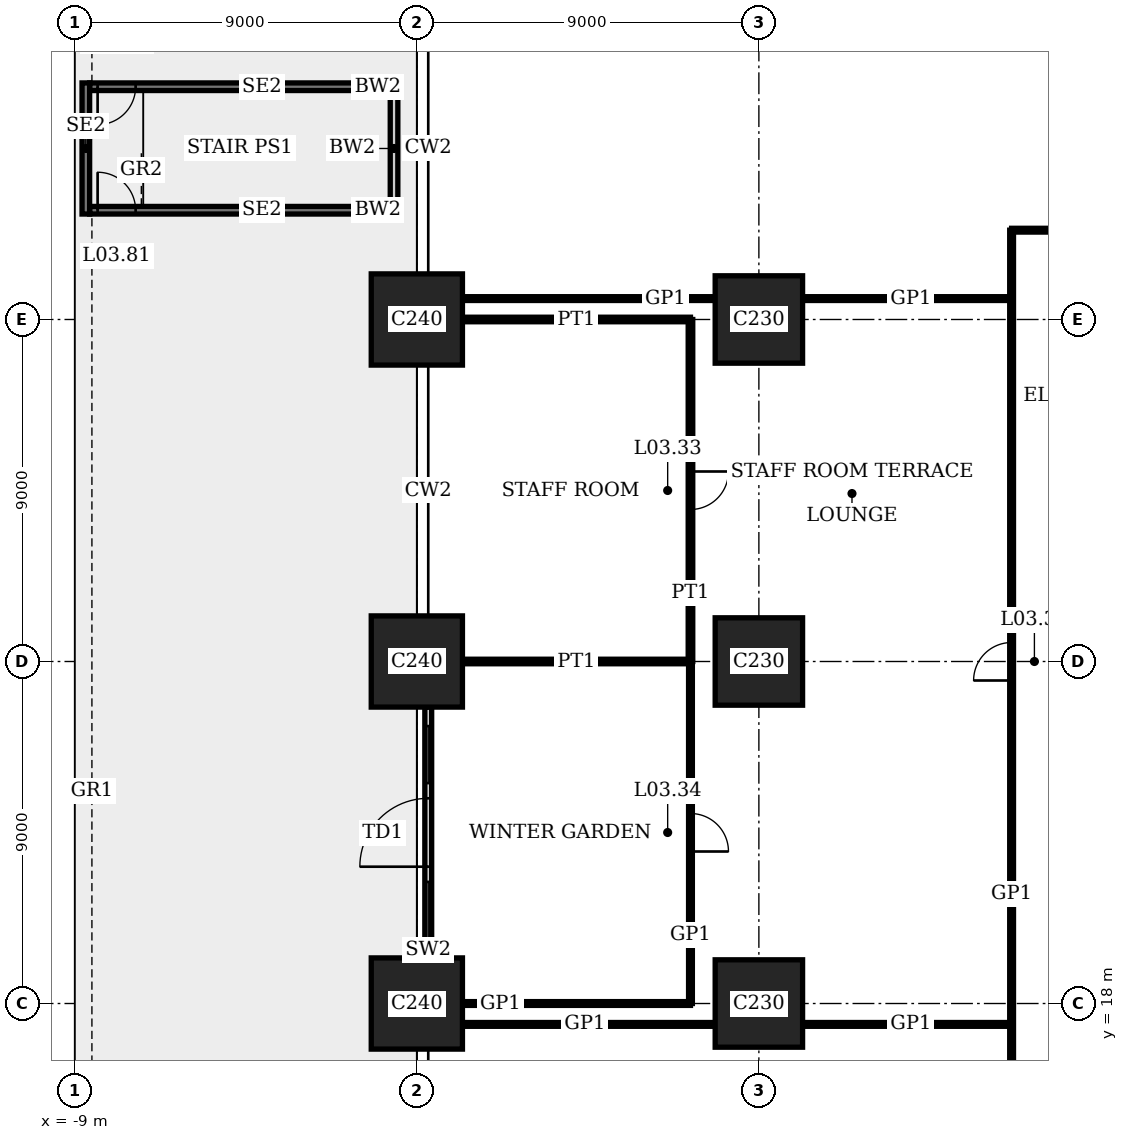
"""IFC4 building model, lengths in metres.
Left out: names, types, materials, properties, quantities, classifications, styles, units other than length and angle.
Written with IfcOpenShell. Run it as: python <this file> out.ifc"""

import sys

from ifc_helpers import new_model, si_unit, direction, frame, frame_2d, origin, origin_2d, place, context, subcontext, project, spatial, rectangle, extrude, element, fill, save


model = new_model("IFC4")
c1 = context("Model", 3, precision=1e-05, world=origin(), true_north=direction((0.0, 1.0)))
c2 = subcontext(c1, "Body", "Model", "MODEL_VIEW")
j1 = project(units=[si_unit("LENGTHUNIT", "METRE"), si_unit("PLANEANGLEUNIT", "RADIAN")], contexts=[c1])
p1 = place(None, origin())
s1 = spatial("IfcSite", under=j1, at=p1, CompositionType="ELEMENT")
p2 = place(p1, origin())
s2 = spatial("IfcBuilding", under=s1, at=p2, CompositionType="ELEMENT")
p3 = place(p2, frame((0.0, 0.0, 15.8)))
s3 = spatial("IfcBuildingStorey", under=s2, at=p3, CompositionType="ELEMENT", Elevation=15.8)
for number, where, z_axis, x_axis in (
    (1, (0.0, 18.0, 0.0), (0.0, 0.0, 1.0), (1.0, 0.0, 0.0)),
    (2, (0.0, 27.0, 0.0), (0.0, 0.0, 1.0), (1.0, 0.0, 0.0)),
    (3, (0.0, 36.0, 0.0), (0.0, 0.0, 1.0), (1.0, 0.0, 0.0)),
):
    element("IfcColumn", number, at=place(p3, frame(where, z_axis=z_axis, x_axis=x_axis)), inside=s3, PredefinedType="COLUMN", context=c2, shape_type="SweptSolid", body=[
        extrude(rectangle(XDim=2.4, YDim=2.4, at=origin_2d()), origin(), (0.0, 0.0, 1.0), 4.0),
    ])
for number, where, z_axis, x_axis in (
    (4, (9.0, 18.0, 0.0), (0.0, 0.0, 1.0), (1.0, 0.0, 0.0)),
    (5, (9.0, 27.0, 0.0), (0.0, 0.0, 1.0), (1.0, 0.0, 0.0)),
    (6, (9.0, 36.0, 0.0), (0.0, 0.0, 1.0), (1.0, 0.0, 0.0)),
):
    element("IfcColumn", number, at=place(p3, frame(where, z_axis=z_axis, x_axis=x_axis)), inside=s3, PredefinedType="COLUMN", context=c2, shape_type="SweptSolid", body=[
        extrude(rectangle(XDim=2.3, YDim=2.3, at=origin_2d()), origin(), (0.0, 0.0, 1.0), 4.0),
    ])
p4 = place(p3, frame((0.3, 19.2, 0.0), z_axis=(0.0, 0.0, 1.0), x_axis=(0.0, 1.0, 0.0)))
e7 = element("IfcWall", 7, at=p4, inside=s3, PredefinedType="SOLIDWALL", context=c2, shape_type="SweptSolid", body=[
    extrude(rectangle(XDim=6.6, YDim=0.18, at=frame_2d((3.3, 0.0))), origin(), (0.0, 0.0, 1.0), 2.95),
])
p5 = place(p4, frame((2.4, 0.0, 0.0)))
e8 = element("IfcOpeningElement", 8, at=p5, cuts=e7, PredefinedType="OPENING", context=c2, shape_type="SweptSolid", body=[
    extrude(rectangle(XDim=1.8, YDim=2.7, at=frame_2d((0.9, 1.35))), frame((0.0, 0.1, 0.0), z_axis=(0.0, -1.0, 0.0), x_axis=(1.0, 0.0, 0.0)), (0.0, 0.0, 1.0), 0.2),
])
p6 = place(p4, frame((0.5, 0.0, 0.3)))
e9 = element("IfcOpeningElement", 9, at=p6, cuts=e7, PredefinedType="OPENING", context=c2, shape_type="SweptSolid", body=[
    extrude(rectangle(XDim=1.5, YDim=2.4, at=frame_2d((0.75, 1.2))), frame((0.0, 0.1, 0.0), z_axis=(0.0, -1.0, 0.0), x_axis=(1.0, 0.0, 0.0)), (0.0, 0.0, 1.0), 0.2),
])
p7 = place(p4, frame((4.6, 0.0, 0.3)))
e10 = element("IfcOpeningElement", 10, at=p7, cuts=e7, PredefinedType="OPENING", context=c2, shape_type="SweptSolid", body=[
    extrude(rectangle(XDim=1.5, YDim=2.4, at=frame_2d((0.75, 1.2))), frame((0.0, 0.1, 0.0), z_axis=(0.0, -1.0, 0.0), x_axis=(1.0, 0.0, 0.0)), (0.0, 0.0, 1.0), 0.2),
])
p8 = place(p3, frame((1.2, 17.45, 0.0), z_axis=(0.0, 0.0, 1.0), x_axis=(1.0, 0.0, 0.0)))
e11 = element("IfcWall", 11, at=p8, inside=s3, PredefinedType="PARTITIONING", context=c2, shape_type="SweptSolid", body=[
    extrude(rectangle(XDim=6.65, YDim=0.1, at=frame_2d((3.325, 0.0))), origin(), (0.0, 0.0, 1.0), 3.75),
])
p9 = place(p3, frame((10.15, 17.45, 0.0), z_axis=(0.0, 0.0, 1.0), x_axis=(1.0, 0.0, 0.0)))
e12 = element("IfcWall", 12, at=p9, inside=s3, PredefinedType="PARTITIONING", context=c2, shape_type="SweptSolid", body=[
    extrude(rectangle(XDim=5.5, YDim=0.1, at=frame_2d((2.75, 0.0))), origin(), (0.0, 0.0, 1.0), 3.75),
])
p10 = place(p3, frame((1.2, 18.0, 0.0), z_axis=(0.0, 0.0, 1.0), x_axis=(1.0, 0.0, 0.0)))
e13 = element("IfcWall", 13, at=p10, inside=s3, PredefinedType="PARTITIONING", context=c2, shape_type="SweptSolid", body=[
    extrude(rectangle(XDim=6.0, YDim=0.1, at=frame_2d((3.0, 0.0))), origin(), (0.0, 0.0, 1.0), 3.05),
])
for number, where, z_axis, x_axis in (
    (14, (1.2, 27.0, 0.0), (0.0, 0.0, 1.0), (1.0, 0.0, 0.0)),
    (15, (1.2, 36.0, 0.0), (0.0, 0.0, 1.0), (1.0, 0.0, 0.0)),
):
    element("IfcWall", number, at=place(p3, frame(where, z_axis=z_axis, x_axis=x_axis)), inside=s3, PredefinedType="PARTITIONING", context=c2, shape_type="SweptSolid", body=[
        extrude(rectangle(XDim=6.0, YDim=0.12, at=frame_2d((3.0, 0.0))), origin(), (0.0, 0.0, 1.0), 3.05),
    ])
p11 = place(p3, frame((1.2, 36.55, 0.0), z_axis=(0.0, 0.0, 1.0), x_axis=(1.0, 0.0, 0.0)))
e16 = element("IfcWall", 16, at=p11, inside=s3, PredefinedType="PARTITIONING", context=c2, shape_type="SweptSolid", body=[
    extrude(rectangle(XDim=6.65, YDim=0.1, at=frame_2d((3.325, 0.0))), origin(), (0.0, 0.0, 1.0), 3.75),
])
p12 = place(p3, frame((10.15, 36.55, 0.0), z_axis=(0.0, 0.0, 1.0), x_axis=(1.0, 0.0, 0.0)))
e17 = element("IfcWall", 17, at=p12, inside=s3, PredefinedType="PARTITIONING", context=c2, shape_type="SweptSolid", body=[
    extrude(rectangle(XDim=5.5, YDim=0.1, at=frame_2d((2.75, 0.0))), origin(), (0.0, 0.0, 1.0), 3.75),
])
p13 = place(p3, frame((15.65, 38.35, 0.0), z_axis=(0.0, 0.0, 1.0), x_axis=(1.0, 0.0, 0.0)))
e18 = element("IfcWall", 18, at=p13, inside=s3, PredefinedType="PARTITIONING", context=c2, shape_type="SweptSolid", body=[
    extrude(rectangle(XDim=15.85, YDim=0.1, at=frame_2d((7.925, 0.0))), origin(), (0.0, 0.0, 1.0), 3.75),
])
p14 = place(p13, frame((7.425, 0.0, 0.0)))
e19 = element("IfcOpeningElement", 19, at=p14, cuts=e18, PredefinedType="OPENING", context=c2, shape_type="SweptSolid", body=[
    extrude(rectangle(XDim=1.0, YDim=2.4, at=frame_2d((0.5, 1.2))), frame((0.0, 0.06, 0.0), z_axis=(0.0, -1.0, 0.0), x_axis=(1.0, 0.0, 0.0)), (0.0, 0.0, 1.0), 0.12),
])
p15 = place(p3, frame((7.2, 27.0, 0.0), z_axis=(0.0, 0.0, 1.0), x_axis=(0.0, 1.0, 0.0)))
e20 = element("IfcWall", 20, at=p15, inside=s3, PredefinedType="PARTITIONING", context=c2, shape_type="SweptSolid", body=[
    extrude(rectangle(XDim=9.0, YDim=0.12, at=frame_2d((4.5, 0.0))), origin(), (0.0, 0.0, 1.0), 3.75),
])
p16 = place(p15, frame((4.0, 0.0, 0.0)))
e21 = element("IfcOpeningElement", 21, at=p16, cuts=e20, PredefinedType="OPENING", context=c2, shape_type="SweptSolid", body=[
    extrude(rectangle(XDim=1.0, YDim=2.4, at=frame_2d((0.5, 1.2))), frame((0.0, 0.07, 0.0), z_axis=(0.0, -1.0, 0.0), x_axis=(1.0, 0.0, 0.0)), (0.0, 0.0, 1.0), 0.14),
])
p17 = place(p3, frame((7.2, 18.0, 0.0), z_axis=(0.0, 0.0, 1.0), x_axis=(0.0, 1.0, 0.0)))
e22 = element("IfcWall", 22, at=p17, inside=s3, PredefinedType="PARTITIONING", context=c2, shape_type="SweptSolid", body=[
    extrude(rectangle(XDim=9.0, YDim=0.1, at=frame_2d((4.5, 0.0))), origin(), (0.0, 0.0, 1.0), 3.75),
])
p18 = place(p17, frame((4.0, 0.0, 0.0)))
e23 = element("IfcOpeningElement", 23, at=p18, cuts=e22, PredefinedType="OPENING", context=c2, shape_type="SweptSolid", body=[
    extrude(rectangle(XDim=1.0, YDim=2.4, at=frame_2d((0.5, 1.2))), frame((0.0, 0.06, 0.0), z_axis=(0.0, -1.0, 0.0), x_axis=(1.0, 0.0, 0.0)), (0.0, 0.0, 1.0), 0.12),
])
p19 = place(p3, frame((15.65, 15.65, 0.0), z_axis=(0.0, 0.0, 1.0), x_axis=(0.0, 1.0, 0.0)))
e24 = element("IfcWall", 24, at=p19, inside=s3, PredefinedType="PARTITIONING", context=c2, shape_type="SweptSolid", body=[
    extrude(rectangle(XDim=22.7, YDim=0.1, at=frame_2d((11.35, 0.0))), origin(), (0.0, 0.0, 1.0), 3.75),
])
p20 = place(p19, frame((10.85, 0.0, 0.0)))
e25 = element("IfcOpeningElement", 25, at=p20, cuts=e24, PredefinedType="OPENING", context=c2, shape_type="SweptSolid", body=[
    extrude(rectangle(XDim=1.0, YDim=2.4, at=frame_2d((0.5, 1.2))), frame((0.0, 0.06, 0.0), z_axis=(0.0, -1.0, 0.0), x_axis=(1.0, 0.0, 0.0)), (0.0, 0.0, 1.0), 0.12),
])
p21 = place(p3, frame((-8.61, 38.875, 0.0), z_axis=(0.0, 0.0, 1.0), x_axis=(1.0, 0.0, 0.0)))
e26 = element("IfcWall", 26, at=p21, inside=s3, PredefinedType="SOLIDWALL", context=c2, shape_type="SweptSolid", body=[
    extrude(rectangle(XDim=7.26, YDim=0.2, at=frame_2d((3.63, 0.0))), origin(), (0.0, 0.0, 1.0), 3.75),
])
p22 = place(p21, frame((0.21, 0.0, 0.0)))
e27 = element("IfcOpeningElement", 27, at=p22, cuts=e26, PredefinedType="OPENING", context=c2, shape_type="SweptSolid", body=[
    extrude(rectangle(XDim=1.0, YDim=2.4, at=frame_2d((0.5, 1.2))), frame((0.0, 0.11, 0.0), z_axis=(0.0, -1.0, 0.0), x_axis=(1.0, 0.0, 0.0)), (0.0, 0.0, 1.0), 0.22),
])
p23 = place(p3, frame((-8.61, 42.125, 0.0), z_axis=(0.0, 0.0, 1.0), x_axis=(1.0, 0.0, 0.0)))
e28 = element("IfcWall", 28, at=p23, inside=s3, PredefinedType="SOLIDWALL", context=c2, shape_type="SweptSolid", body=[
    extrude(rectangle(XDim=7.26, YDim=0.2, at=frame_2d((3.63, 0.0))), origin(), (0.0, 0.0, 1.0), 3.75),
])
p24 = place(p23, frame((0.21, 0.0, 0.0)))
e29 = element("IfcOpeningElement", 29, at=p24, cuts=e28, PredefinedType="OPENING", context=c2, shape_type="SweptSolid", body=[
    extrude(rectangle(XDim=1.0, YDim=2.4, at=frame_2d((0.5, 1.2))), frame((0.0, 0.11, 0.0), z_axis=(0.0, -1.0, 0.0), x_axis=(1.0, 0.0, 0.0)), (0.0, 0.0, 1.0), 0.22),
])
for number, where, z_axis, x_axis in (
    (30, (-1.35, 38.875, 0.0), (0.0, 0.0, 1.0), (1.0, 0.0, 0.0)),
    (31, (-1.35, 42.125, 0.0), (0.0, 0.0, 1.0), (1.0, 0.0, 0.0)),
):
    element("IfcWall", number, at=place(p3, frame(where, z_axis=z_axis, x_axis=x_axis)), inside=s3, PredefinedType="SOLIDWALL", context=c2, shape_type="SweptSolid", body=[
        extrude(rectangle(XDim=0.65, YDim=0.2, at=frame_2d((0.325, 0.0))), origin(), (0.0, 0.0, 1.0), 3.75),
    ])
for number, where, z_axis, x_axis in (
    (32, (-0.6, 38.775, 0.0), (0.0, 0.0, 1.0), (0.0, 1.0, 0.0)),
    (33, (-8.71, 38.775, 0.0), (0.0, 0.0, 1.0), (0.0, 1.0, 0.0)),
):
    element("IfcWall", number, at=place(p3, frame(where, z_axis=z_axis, x_axis=x_axis)), inside=s3, PredefinedType="SOLIDWALL", context=c2, shape_type="SweptSolid", body=[
        extrude(rectangle(XDim=3.45, YDim=0.2, at=frame_2d((1.725, 0.0))), origin(), (0.0, 0.0, 1.0), 3.75),
    ])
p25 = place(p5, origin())
e34 = element("IfcDoor", 34, at=p25, inside=s3, OperationType="DOUBLE_DOOR_SINGLE_SWING", PredefinedType="DOOR", context=c2, shape_type="SweptSolid", body=[
    extrude(rectangle(XDim=1.8, YDim=2.7, at=frame_2d((0.9, 1.35))), frame((0.0, 0.035, 0.0), z_axis=(0.0, -1.0, 0.0), x_axis=(1.0, 0.0, 0.0)), (0.0, 0.0, 1.0), 0.07),
])
fill(e8, e34)
p26 = place(p6, origin())
e35 = element("IfcWindow", 35, at=p26, inside=s3, PartitioningType="SINGLE_PANEL", PredefinedType="WINDOW", context=c2, shape_type="SweptSolid", body=[
    extrude(rectangle(XDim=1.5, YDim=2.4, at=frame_2d((0.75, 1.2))), frame((0.0, 0.03, 0.0), z_axis=(0.0, -1.0, 0.0), x_axis=(1.0, 0.0, 0.0)), (0.0, 0.0, 1.0), 0.06),
])
fill(e9, e35)
p27 = place(p7, origin())
e36 = element("IfcWindow", 36, at=p27, inside=s3, PartitioningType="SINGLE_PANEL", PredefinedType="WINDOW", context=c2, shape_type="SweptSolid", body=[
    extrude(rectangle(XDim=1.5, YDim=2.4, at=frame_2d((0.75, 1.2))), frame((0.0, 0.03, 0.0), z_axis=(0.0, -1.0, 0.0), x_axis=(1.0, 0.0, 0.0)), (0.0, 0.0, 1.0), 0.06),
])
fill(e10, e36)
p28 = place(p16, origin())
e37 = element("IfcDoor", 37, at=p28, inside=s3, OperationType="SINGLE_SWING_RIGHT", PredefinedType="DOOR", context=c2, shape_type="SweptSolid", body=[
    extrude(rectangle(XDim=1.0, YDim=2.4, at=frame_2d((0.5, 1.2))), frame((0.0, 0.025, 0.0), z_axis=(0.0, -1.0, 0.0), x_axis=(1.0, 0.0, 0.0)), (0.0, 0.0, 1.0), 0.05),
])
fill(e21, e37)
p29 = place(p18, origin())
e38 = element("IfcDoor", 38, at=p29, inside=s3, OperationType="SINGLE_SWING_LEFT", PredefinedType="DOOR", context=c2, shape_type="SweptSolid", body=[
    extrude(rectangle(XDim=1.0, YDim=2.4, at=frame_2d((0.5, 1.2))), frame((0.0, 0.02, 0.0), z_axis=(0.0, -1.0, 0.0), x_axis=(1.0, 0.0, 0.0)), (0.0, 0.0, 1.0), 0.04),
])
fill(e23, e38)
p30 = place(p20, origin())
e39 = element("IfcDoor", 39, at=p30, inside=s3, OperationType="SINGLE_SWING_RIGHT", PredefinedType="DOOR", context=c2, shape_type="SweptSolid", body=[
    extrude(rectangle(XDim=1.0, YDim=2.4, at=frame_2d((0.5, 1.2))), frame((0.0, 0.02, 0.0), z_axis=(0.0, -1.0, 0.0), x_axis=(1.0, 0.0, 0.0)), (0.0, 0.0, 1.0), 0.04),
])
fill(e25, e39)
p31 = place(p22, origin())
e40 = element("IfcDoor", 40, at=p31, inside=s3, OperationType="SINGLE_SWING_RIGHT", PredefinedType="DOOR", context=c2, shape_type="SweptSolid", body=[
    extrude(rectangle(XDim=1.0, YDim=2.4, at=frame_2d((0.5, 1.2))), frame((0.0, 0.03, 0.0), z_axis=(0.0, -1.0, 0.0), x_axis=(1.0, 0.0, 0.0)), (0.0, 0.0, 1.0), 0.06),
])
fill(e27, e40)
p32 = place(p24, origin())
e41 = element("IfcDoor", 41, at=p32, inside=s3, OperationType="SINGLE_SWING_LEFT", PredefinedType="DOOR", context=c2, shape_type="SweptSolid", body=[
    extrude(rectangle(XDim=1.0, YDim=2.4, at=frame_2d((0.5, 1.2))), frame((0.0, 0.03, 0.0), z_axis=(0.0, -1.0, 0.0), x_axis=(1.0, 0.0, 0.0)), (0.0, 0.0, 1.0), 0.06),
])
fill(e29, e41)
save(model, sys.argv[1])
